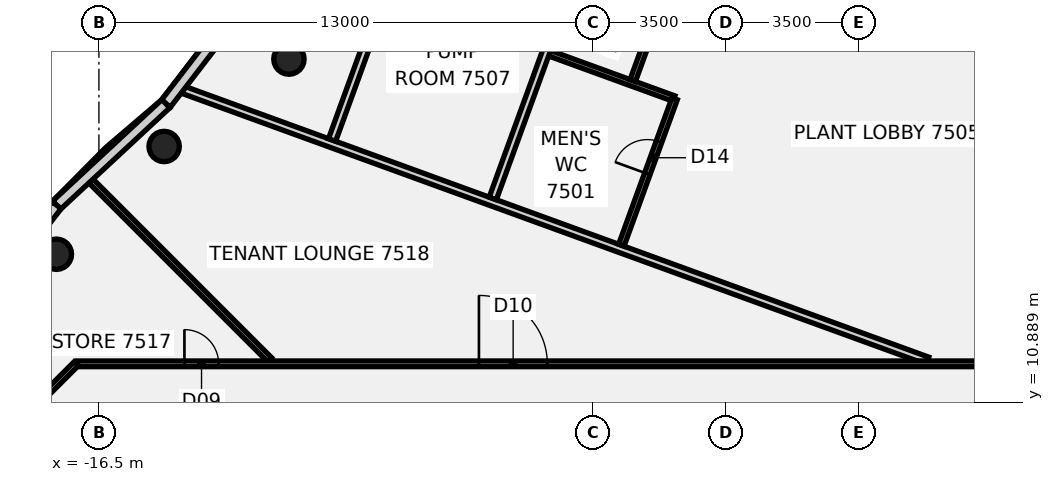
"""IFC4 building model, lengths in metres.
Left out: names, types, materials, properties, quantities, classifications, styles, units other than length and angle.
Written with IfcOpenShell. Run it as: python <this file> out.ifc"""

import sys

from ifc_helpers import new_model, si_unit, direction, frame, frame_2d, origin, origin_2d, place, context, subcontext, project, spatial, rectangle, circle, extrude, element, fill, save


model = new_model("IFC4")
c1 = context("Model", 3, precision=1e-05, world=origin(), true_north=direction((0.0, 1.0)))
c2 = subcontext(c1, "Body", "Model", "MODEL_VIEW")
j1 = project(units=[si_unit("LENGTHUNIT", "METRE"), si_unit("PLANEANGLEUNIT", "RADIAN")], contexts=[c1])
p1 = place(None, origin())
s1 = spatial("IfcSite", under=j1, at=p1, CompositionType="ELEMENT")
p2 = place(p1, origin())
s2 = spatial("IfcBuilding", under=s1, at=p2, CompositionType="ELEMENT")
p3 = place(p2, frame((0.0, 0.0, 305.4)))
s3 = spatial("IfcBuildingStorey", under=s2, at=p3, CompositionType="ELEMENT", Elevation=305.4)
for number, where, z_axis, x_axis in (
    (1, (-11.5, 19.919, -0.18), (0.0, 0.0, 1.0), (1.0, 0.0, 0.0)),
    (2, (-14.784, 17.619, -0.18), (0.0, 0.0, 1.0), (1.0, 0.0, 0.0)),
    (3, (-17.619, 14.784, -0.18), (0.0, 0.0, 1.0), (1.0, 0.0, 0.0)),
):
    element("IfcColumn", number, at=place(p3, frame(where, z_axis=z_axis, x_axis=x_axis)), inside=s3, PredefinedType="COLUMN", context=c2, shape_type="SweptSolid", body=[
        extrude(circle(Radius=0.4, at=origin_2d()), origin(), (0.0, 0.0, 1.0), 4.0),
    ])
p4 = place(p3, frame((-16.921, 16.921, 0.0), z_axis=(0.0, 0.0, 1.0), x_axis=(0.707106781187, -0.707106781187, 0.0)))
e4 = element("IfcWall", 4, at=p4, inside=s3, PredefinedType="PARTITIONING", context=c2, shape_type="SweptSolid", body=[
    extrude(rectangle(XDim=6.946, YDim=0.15, at=frame_2d((3.473, 0.0))), origin(), (0.0, 0.0, 1.0), 3.22),
])
p5 = place(p3, frame((-14.271, 19.106, 0.0), z_axis=(0.0, 0.0, 1.0), x_axis=(0.939707843555, -0.341978316216, 0.0)))
e5 = element("IfcWall", 5, at=p5, inside=s3, PredefinedType="PARTITIONING", context=c2, shape_type="SweptSolid", body=[
    extrude(rectangle(XDim=20.83, YDim=0.2, at=frame_2d((10.415, 0.0))), origin(), (0.0, 0.0, 1.0), 3.22),
])
p6 = place(p3, frame((-4.64, 20.071, 0.0), z_axis=(0.0, 0.0, 1.0), x_axis=(0.939625353143, -0.342204903138, 0.0)))
e6 = element("IfcWall", 6, at=p6, inside=s3, PredefinedType="PARTITIONING", context=c2, shape_type="SweptSolid", body=[
    extrude(rectangle(XDim=3.48, YDim=0.15, at=frame_2d((1.74, 0.0))), origin(), (0.0, 0.0, 1.0), 3.22),
])
p7 = place(p3, frame((-17.065, 11.9, 0.0), z_axis=(0.0, 0.0, 1.0), x_axis=(1.0, 0.0, 0.0)))
e7 = element("IfcWall", 7, at=p7, inside=s3, PredefinedType="PARTITIONING", context=c2, shape_type="SweptSolid", body=[
    extrude(rectangle(XDim=34.165, YDim=0.15, at=frame_2d((17.083, 0.0))), origin(), (0.0, 0.0, 1.0), 3.22),
])
p8 = place(p7, frame((24.544, 0.0, 0.0)))
e8 = element("IfcOpeningElement", 8, at=p8, cuts=e7, PredefinedType="OPENING", context=c2, shape_type="SweptSolid", body=[
    extrude(rectangle(XDim=1.8, YDim=2.1, at=frame_2d((0.9, 1.05))), frame((0.0, 0.085, 0.0), z_axis=(0.0, -1.0, 0.0), x_axis=(1.0, 0.0, 0.0)), (0.0, 0.0, 1.0), 0.17),
])
p9 = place(p7, frame((2.815, 0.0, 0.0)))
e9 = element("IfcOpeningElement", 9, at=p9, cuts=e7, PredefinedType="OPENING", context=c2, shape_type="SweptSolid", body=[
    extrude(rectangle(XDim=0.9, YDim=2.1, at=frame_2d((0.45, 1.05))), frame((0.0, 0.085, 0.0), z_axis=(0.0, -1.0, 0.0), x_axis=(1.0, 0.0, 0.0)), (0.0, 0.0, 1.0), 0.17),
])
p10 = place(p7, frame((10.565, 0.0, 0.0)))
e10 = element("IfcOpeningElement", 10, at=p10, cuts=e7, PredefinedType="OPENING", context=c2, shape_type="SweptSolid", body=[
    extrude(rectangle(XDim=1.8, YDim=2.1, at=frame_2d((0.9, 1.05))), frame((0.0, 0.085, 0.0), z_axis=(0.0, -1.0, 0.0), x_axis=(1.0, 0.0, 0.0)), (0.0, 0.0, 1.0), 0.17),
])
p11 = place(p3, frame((-18.872, 10.128, 0.0), z_axis=(0.0, 0.0, 1.0), x_axis=(0.707106781187, 0.707106781187, 0.0)))
e11 = element("IfcWall", 11, at=p11, inside=s3, PredefinedType="PARTITIONING", context=c2, shape_type="SweptSolid", body=[
    extrude(rectangle(XDim=2.505, YDim=0.15, at=frame_2d((1.253, 0.0))), origin(), (0.0, 0.0, 1.0), 3.22),
])
p12 = place(p3, frame((-10.365, 17.791, 0.0), z_axis=(0.0, 0.0, 1.0), x_axis=(0.342032792834, 0.939688016645, 0.0)))
e12 = element("IfcWall", 12, at=p12, inside=s3, PredefinedType="PARTITIONING", context=c2, shape_type="SweptSolid", body=[
    extrude(rectangle(XDim=8.66, YDim=0.2, at=frame_2d((4.33, 0.0))), origin(), (0.0, 0.0, 1.0), 3.22),
])
p13 = place(p12, frame((6.6, 0.0, 0.0)))
e13 = element("IfcOpeningElement", 13, at=p13, cuts=e12, PredefinedType="OPENING", context=c2, shape_type="SweptSolid", body=[
    extrude(rectangle(XDim=1.4, YDim=2.1, at=frame_2d((0.7, 1.05))), frame((0.0, 0.11, 0.0), z_axis=(0.0, -1.0, 0.0), x_axis=(1.0, 0.0, 0.0)), (0.0, 0.0, 1.0), 0.22),
])
p14 = place(p3, frame((-6.136, 16.252, 0.0), z_axis=(0.0, 0.0, 1.0), x_axis=(0.341890434998, 0.939739820619, 0.0)))
e14 = element("IfcWall", 14, at=p14, inside=s3, PredefinedType="PARTITIONING", context=c2, shape_type="SweptSolid", body=[
    extrude(rectangle(XDim=6.518, YDim=0.2, at=frame_2d((3.259, 0.0))), origin(), (0.0, 0.0, 1.0), 3.22),
])
p15 = place(p3, frame((-2.753, 15.021, 0.0), z_axis=(0.0, 0.0, 1.0), x_axis=(0.341929559358, 0.939725585709, 0.0)))
e15 = element("IfcWall", 15, at=p15, inside=s3, PredefinedType="PARTITIONING", context=c2, shape_type="SweptSolid", body=[
    extrude(rectangle(XDim=4.099, YDim=0.15, at=frame_2d((2.05, 0.0))), origin(), (0.0, 0.0, 1.0), 3.22),
])
p16 = place(p15, frame((2.0, 0.0, 0.0)))
e16 = element("IfcOpeningElement", 16, at=p16, cuts=e15, PredefinedType="OPENING", context=c2, shape_type="SweptSolid", body=[
    extrude(rectangle(XDim=0.9, YDim=2.1, at=frame_2d((0.45, 1.05))), frame((0.0, 0.085, 0.0), z_axis=(0.0, -1.0, 0.0), x_axis=(1.0, 0.0, 0.0)), (0.0, 0.0, 1.0), 0.17),
])
p17 = place(p3, frame((-2.452, 19.354, 0.0), z_axis=(0.0, 0.0, 1.0), x_axis=(0.341765797908, 0.939785155969, 0.0)))
e17 = element("IfcWall", 17, at=p17, inside=s3, PredefinedType="PARTITIONING", context=c2, shape_type="SweptSolid", body=[
    extrude(rectangle(XDim=1.724, YDim=0.15, at=frame_2d((0.862, 0.0))), origin(), (0.0, 0.0, 1.0), 3.22),
])
p18 = place(p3, frame((-13.409, 20.474, 0.0), z_axis=(0.0, 0.0, 1.0), x_axis=(-0.609396950442, -0.792865282877, 0.0)))
e18 = element("IfcWall", 18, at=p18, inside=s3, PredefinedType="SOLIDWALL", context=c2, shape_type="SweptSolid", body=[
    extrude(rectangle(XDim=2.181, YDim=0.3, at=frame_2d((1.09, 0.0))), origin(), (0.0, 0.0, 1.0), 3.82),
])
p19 = place(p3, frame((-14.739, 18.745, 0.0), z_axis=(0.0, 0.0, 1.0), x_axis=(-0.73266715928, -0.680587124263, 0.0)))
e19 = element("IfcWall", 19, at=p19, inside=s3, PredefinedType="SOLIDWALL", context=c2, shape_type="SweptSolid", body=[
    extrude(rectangle(XDim=3.924, YDim=0.3, at=frame_2d((1.962, 0.0))), origin(), (0.0, 0.0, 1.0), 3.82),
])
p20 = place(p3, frame((-17.613, 16.075, 0.0), z_axis=(0.0, 0.0, 1.0), x_axis=(-0.610785688376, -0.79179596038, 0.0)))
e20 = element("IfcWall", 20, at=p20, inside=s3, PredefinedType="SOLIDWALL", context=c2, shape_type="SweptSolid", body=[
    extrude(rectangle(XDim=3.938, YDim=0.3, at=frame_2d((1.969, 0.0))), origin(), (0.0, 0.0, 1.0), 3.82),
])
p21 = place(p9, origin())
e21 = element("IfcDoor", 21, at=p21, inside=s3, OperationType="SINGLE_SWING_RIGHT", PredefinedType="DOOR", context=c2, shape_type="SweptSolid", body=[
    extrude(rectangle(XDim=0.9, YDim=2.1, at=frame_2d((0.45, 1.05))), frame((0.0, 0.025, 0.0), z_axis=(0.0, -1.0, 0.0), x_axis=(1.0, 0.0, 0.0)), (0.0, 0.0, 1.0), 0.05),
])
fill(e9, e21)
p22 = place(p10, origin())
e22 = element("IfcDoor", 22, at=p22, inside=s3, OperationType="DOUBLE_DOOR_SINGLE_SWING", PredefinedType="DOOR", context=c2, shape_type="SweptSolid", body=[
    extrude(rectangle(XDim=1.8, YDim=2.1, at=frame_2d((0.9, 1.05))), frame((0.0, 0.025, 0.0), z_axis=(0.0, -1.0, 0.0), x_axis=(1.0, 0.0, 0.0)), (0.0, 0.0, 1.0), 0.05),
])
fill(e10, e22)
p23 = place(p16, origin())
e23 = element("IfcDoor", 23, at=p23, inside=s3, OperationType="SINGLE_SWING_LEFT", PredefinedType="DOOR", context=c2, shape_type="SweptSolid", body=[
    extrude(rectangle(XDim=0.9, YDim=2.1, at=frame_2d((0.45, 1.05))), frame((0.0, 0.025, 0.0), z_axis=(0.0, -1.0, 0.0), x_axis=(1.0, 0.0, 0.0)), (0.0, 0.0, 1.0), 0.05),
])
fill(e16, e23)
save(model, sys.argv[1])
